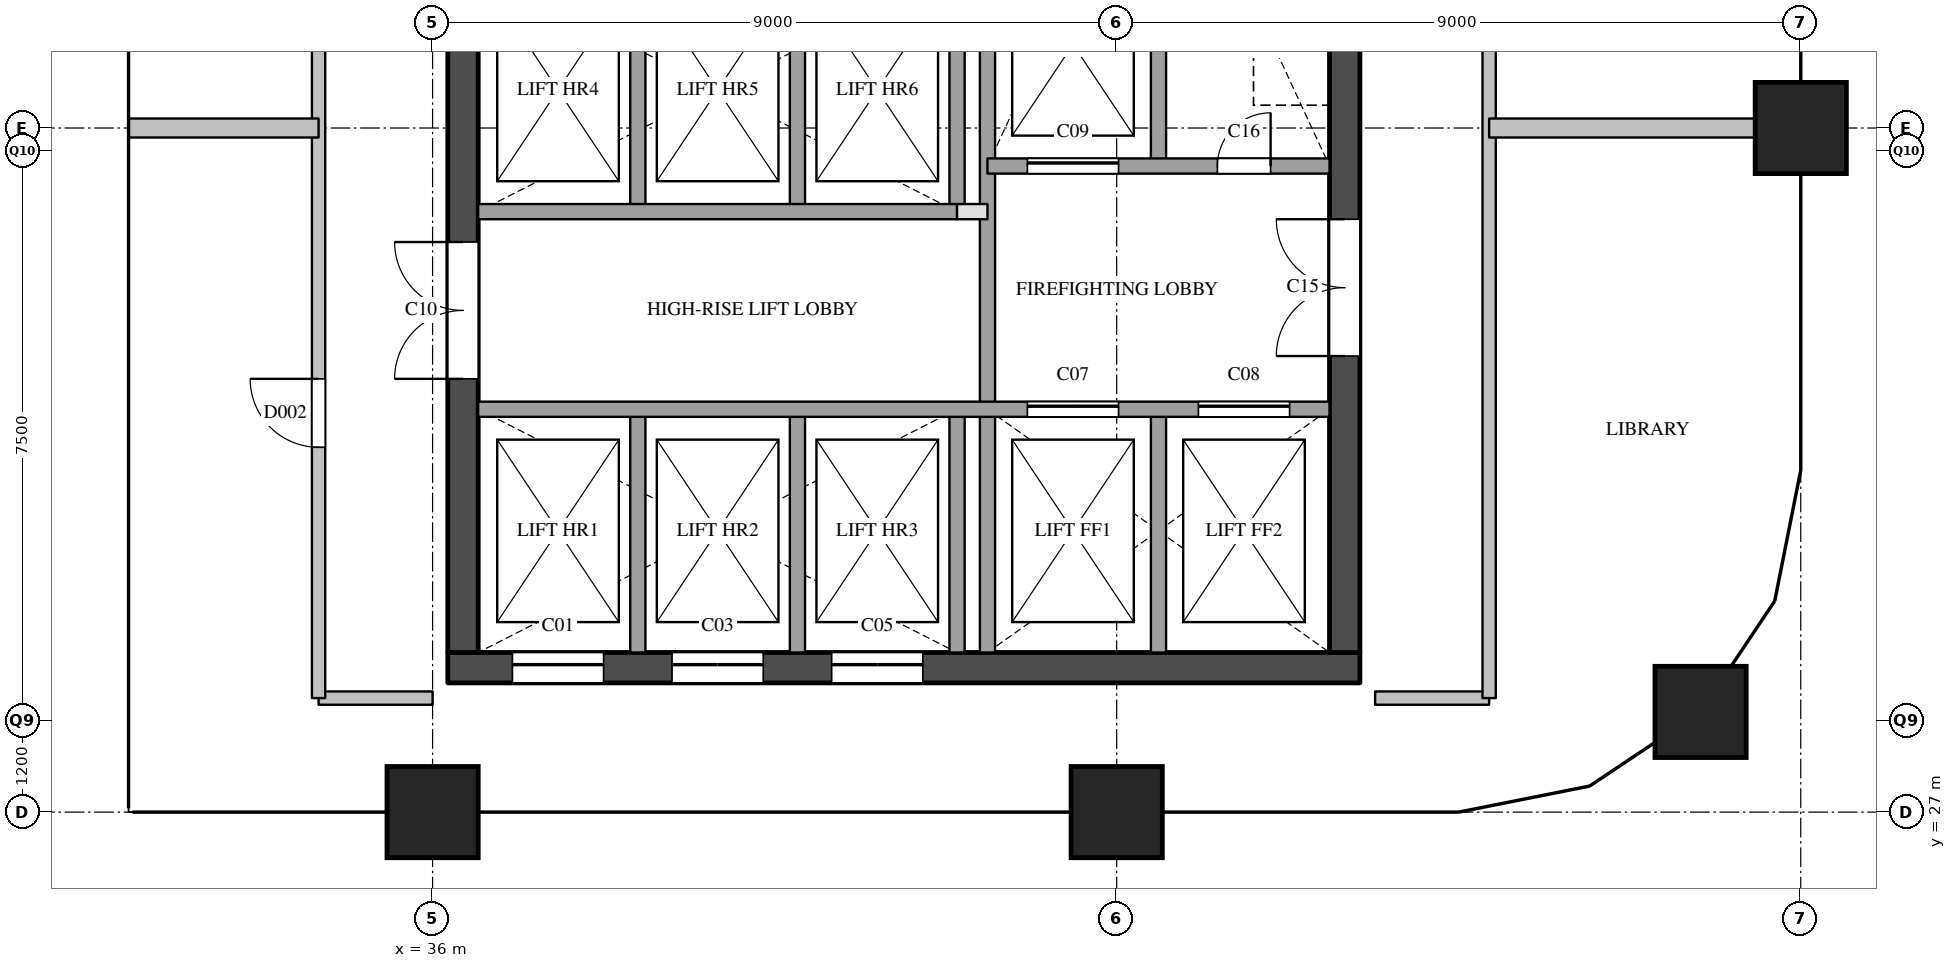
"""IFC4 building model, lengths in metres.
Left out: names, types, materials, properties, quantities, classifications, styles, units other than length and angle.
Written with IfcOpenShell. Run it as: python <this file> out.ifc"""

import sys

from ifc_helpers import new_model, si_unit, direction, frame, frame_2d, origin, origin_2d, place, context, subcontext, project, spatial, rectangle, extrude, element, fill, save


model = new_model("IFC4")
c1 = context("Model", 3, precision=1e-05, world=origin(), true_north=direction((0.0, 1.0)))
c2 = subcontext(c1, "Body", "Model", "MODEL_VIEW")
j1 = project(units=[si_unit("LENGTHUNIT", "METRE"), si_unit("PLANEANGLEUNIT", "RADIAN")], contexts=[c1])
p1 = place(None, origin())
s1 = spatial("IfcSite", under=j1, at=p1, CompositionType="ELEMENT")
p2 = place(p1, origin())
s2 = spatial("IfcBuilding", under=s1, at=p2, CompositionType="ELEMENT")
p3 = place(p2, frame((0.0, 0.0, 218.9)))
s3 = spatial("IfcBuildingStorey", under=s2, at=p3, CompositionType="ELEMENT", Elevation=218.9)
for number, where, z_axis, x_axis in (
    (1, (36.0, 27.0, 0.0), (0.0, 0.0, 1.0), (1.0, 0.0, 0.0)),
    (2, (45.0, 27.0, 0.0), (0.0, 0.0, 1.0), (1.0, 0.0, 0.0)),
    (3, (52.682, 28.318, 0.0), (0.0, 0.0, 1.0), (1.0, 0.0, 0.0)),
    (4, (54.0, 36.0, 0.0), (0.0, 0.0, 1.0), (1.0, 0.0, 0.0)),
):
    element("IfcColumn", number, at=place(p3, frame(where, z_axis=z_axis, x_axis=x_axis)), inside=s3, PredefinedType="COLUMN", context=c2, shape_type="SweptSolid", body=[
        extrude(rectangle(XDim=1.2, YDim=1.2, at=origin_2d()), origin(), (0.0, 0.0, 1.0), 3.9),
    ])
p4 = place(p3, frame((36.2, 28.9, 0.0), z_axis=(0.0, 0.0, 1.0), x_axis=(1.0, 0.0, 0.0)))
e5 = element("IfcWall", 5, at=p4, inside=s3, PredefinedType="SHEAR", context=c2, shape_type="SweptSolid", body=[
    extrude(rectangle(XDim=12.0, YDim=0.4, at=frame_2d((6.0, 0.0))), origin(), (0.0, 0.0, 1.0), 3.6),
])
p5 = place(p4, frame((0.85, 0.0, 0.0)))
e6 = element("IfcOpeningElement", 6, at=p5, cuts=e5, PredefinedType="OPENING", context=c2, shape_type="SweptSolid", body=[
    extrude(rectangle(XDim=1.2, YDim=2.1, at=frame_2d((0.6, 1.05))), frame((0.0, 0.21, 0.0), z_axis=(0.0, -1.0, 0.0), x_axis=(1.0, 0.0, 0.0)), (0.0, 0.0, 1.0), 0.42),
])
p6 = place(p4, frame((2.95, 0.0, 0.0)))
e7 = element("IfcOpeningElement", 7, at=p6, cuts=e5, PredefinedType="OPENING", context=c2, shape_type="SweptSolid", body=[
    extrude(rectangle(XDim=1.2, YDim=2.1, at=frame_2d((0.6, 1.05))), frame((0.0, 0.21, 0.0), z_axis=(0.0, -1.0, 0.0), x_axis=(1.0, 0.0, 0.0)), (0.0, 0.0, 1.0), 0.42),
])
p7 = place(p4, frame((5.05, 0.0, 0.0)))
e8 = element("IfcOpeningElement", 8, at=p7, cuts=e5, PredefinedType="OPENING", context=c2, shape_type="SweptSolid", body=[
    extrude(rectangle(XDim=1.2, YDim=2.1, at=frame_2d((0.6, 1.05))), frame((0.0, 0.21, 0.0), z_axis=(0.0, -1.0, 0.0), x_axis=(1.0, 0.0, 0.0)), (0.0, 0.0, 1.0), 0.42),
])
p8 = place(p3, frame((36.4, 29.1, 0.0), z_axis=(0.0, 0.0, 1.0), x_axis=(0.0, 1.0, 0.0)))
e9 = element("IfcWall", 9, at=p8, inside=s3, PredefinedType="SHEAR", context=c2, shape_type="SweptSolid", body=[
    extrude(rectangle(XDim=20.3, YDim=0.4, at=frame_2d((10.15, 0.0))), origin(), (0.0, 0.0, 1.0), 3.6),
])
p9 = place(p8, frame((3.6, 0.0, 0.0)))
e10 = element("IfcOpeningElement", 10, at=p9, cuts=e9, PredefinedType="OPENING", context=c2, shape_type="SweptSolid", body=[
    extrude(rectangle(XDim=1.8, YDim=2.1, at=frame_2d((0.9, 1.05))), frame((0.0, 0.21, 0.0), z_axis=(0.0, -1.0, 0.0), x_axis=(1.0, 0.0, 0.0)), (0.0, 0.0, 1.0), 0.42),
])
p10 = place(p8, frame((16.4, 0.0, 0.0)))
e11 = element("IfcOpeningElement", 11, at=p10, cuts=e9, PredefinedType="OPENING", context=c2, shape_type="SweptSolid", body=[
    extrude(rectangle(XDim=1.0, YDim=2.1, at=frame_2d((0.5, 1.05))), frame((0.0, 0.21, 0.0), z_axis=(0.0, -1.0, 0.0), x_axis=(1.0, 0.0, 0.0)), (0.0, 0.0, 1.0), 0.42),
])
p11 = place(p3, frame((48.0, 29.1, 0.0), z_axis=(0.0, 0.0, 1.0), x_axis=(0.0, 1.0, 0.0)))
e12 = element("IfcWall", 12, at=p11, inside=s3, PredefinedType="SHEAR", context=c2, shape_type="SweptSolid", body=[
    extrude(rectangle(XDim=20.3, YDim=0.4, at=frame_2d((10.15, 0.0))), origin(), (0.0, 0.0, 1.0), 3.6),
])
p12 = place(p11, frame((12.5, 0.0, 0.0)))
e13 = element("IfcOpeningElement", 13, at=p12, cuts=e12, PredefinedType="OPENING", context=c2, shape_type="SweptSolid", body=[
    extrude(rectangle(XDim=0.7, YDim=2.1, at=frame_2d((0.35, 1.05))), frame((0.0, 0.21, 0.0), z_axis=(0.0, -1.0, 0.0), x_axis=(1.0, 0.0, 0.0)), (0.0, 0.0, 1.0), 0.42),
])
p13 = place(p11, frame((3.9, 0.0, 0.0)))
e14 = element("IfcOpeningElement", 14, at=p13, cuts=e12, PredefinedType="OPENING", context=c2, shape_type="SweptSolid", body=[
    extrude(rectangle(XDim=1.8, YDim=2.1, at=frame_2d((0.9, 1.05))), frame((0.0, 0.21, 0.0), z_axis=(0.0, -1.0, 0.0), x_axis=(1.0, 0.0, 0.0)), (0.0, 0.0, 1.0), 0.42),
])
p14 = place(p3, frame((38.7, 29.1, 0.0), z_axis=(0.0, 0.0, 1.0), x_axis=(0.0, 1.0, 0.0)))
e15 = element("IfcWall", 15, at=p14, inside=s3, PredefinedType="SOLIDWALL", context=c2, shape_type="SweptSolid", body=[
    extrude(rectangle(XDim=3.2, YDim=0.2, at=frame_2d((1.6, 0.0))), origin(), (0.0, 0.0, 1.0), 3.6),
])
p15 = place(p3, frame((38.7, 34.9, 0.0), z_axis=(0.0, 0.0, 1.0), x_axis=(0.0, 1.0, 0.0)))
e16 = element("IfcWall", 16, at=p15, inside=s3, PredefinedType="SOLIDWALL", context=c2, shape_type="SweptSolid", body=[
    extrude(rectangle(XDim=3.2, YDim=0.2, at=frame_2d((1.6, 0.0))), origin(), (0.0, 0.0, 1.0), 3.6),
])
p16 = place(p3, frame((40.8, 29.1, 0.0), z_axis=(0.0, 0.0, 1.0), x_axis=(0.0, 1.0, 0.0)))
e17 = element("IfcWall", 17, at=p16, inside=s3, PredefinedType="SOLIDWALL", context=c2, shape_type="SweptSolid", body=[
    extrude(rectangle(XDim=3.2, YDim=0.2, at=frame_2d((1.6, 0.0))), origin(), (0.0, 0.0, 1.0), 3.6),
])
p17 = place(p3, frame((40.8, 34.9, 0.0), z_axis=(0.0, 0.0, 1.0), x_axis=(0.0, 1.0, 0.0)))
e18 = element("IfcWall", 18, at=p17, inside=s3, PredefinedType="SOLIDWALL", context=c2, shape_type="SweptSolid", body=[
    extrude(rectangle(XDim=3.2, YDim=0.2, at=frame_2d((1.6, 0.0))), origin(), (0.0, 0.0, 1.0), 3.6),
])
p18 = place(p3, frame((42.9, 29.1, 0.0), z_axis=(0.0, 0.0, 1.0), x_axis=(0.0, 1.0, 0.0)))
e19 = element("IfcWall", 19, at=p18, inside=s3, PredefinedType="SOLIDWALL", context=c2, shape_type="SweptSolid", body=[
    extrude(rectangle(XDim=3.2, YDim=0.2, at=frame_2d((1.6, 0.0))), origin(), (0.0, 0.0, 1.0), 3.6),
])
p19 = place(p3, frame((42.9, 34.9, 0.0), z_axis=(0.0, 0.0, 1.0), x_axis=(0.0, 1.0, 0.0)))
e20 = element("IfcWall", 20, at=p19, inside=s3, PredefinedType="SOLIDWALL", context=c2, shape_type="SweptSolid", body=[
    extrude(rectangle(XDim=3.2, YDim=0.2, at=frame_2d((1.6, 0.0))), origin(), (0.0, 0.0, 1.0), 3.6),
])
p20 = place(p3, frame((43.3, 29.1, 0.0), z_axis=(0.0, 0.0, 1.0), x_axis=(0.0, 1.0, 0.0)))
e21 = element("IfcWall", 21, at=p20, inside=s3, PredefinedType="SOLIDWALL", context=c2, shape_type="SweptSolid", body=[
    extrude(rectangle(XDim=9.9, YDim=0.2, at=frame_2d((4.95, 0.0))), origin(), (0.0, 0.0, 1.0), 3.6),
])
for number, where, z_axis, x_axis in (
    (22, (45.55, 29.1, 0.0), (0.0, 0.0, 1.0), (0.0, 1.0, 0.0)),
    (23, (45.55, 35.5, 0.0), (0.0, 0.0, 1.0), (0.0, 1.0, 0.0)),
):
    element("IfcWall", number, at=place(p3, frame(where, z_axis=z_axis, x_axis=x_axis)), inside=s3, PredefinedType="SOLIDWALL", context=c2, shape_type="SweptSolid", body=[
        extrude(rectangle(XDim=3.2, YDim=0.2, at=frame_2d((1.6, 0.0))), origin(), (0.0, 0.0, 1.0), 3.6),
    ])
p21 = place(p3, frame((36.6, 32.3, 0.0), z_axis=(0.0, 0.0, 1.0), x_axis=(1.0, 0.0, 0.0)))
e24 = element("IfcWall", 24, at=p21, inside=s3, PredefinedType="SOLIDWALL", context=c2, shape_type="SweptSolid", body=[
    extrude(rectangle(XDim=11.2, YDim=0.2, at=frame_2d((5.6, 0.0))), origin(), (0.0, 0.0, 1.0), 3.6),
])
p22 = place(p21, frame((7.225, 0.0, 0.0)))
e25 = element("IfcOpeningElement", 25, at=p22, cuts=e24, PredefinedType="OPENING", context=c2, shape_type="SweptSolid", body=[
    extrude(rectangle(XDim=1.2, YDim=2.1, at=frame_2d((0.6, 1.05))), frame((0.0, 0.11, 0.0), z_axis=(0.0, -1.0, 0.0), x_axis=(1.0, 0.0, 0.0)), (0.0, 0.0, 1.0), 0.22),
])
p23 = place(p21, frame((9.475, 0.0, 0.0)))
e26 = element("IfcOpeningElement", 26, at=p23, cuts=e24, PredefinedType="OPENING", context=c2, shape_type="SweptSolid", body=[
    extrude(rectangle(XDim=1.2, YDim=2.1, at=frame_2d((0.6, 1.05))), frame((0.0, 0.11, 0.0), z_axis=(0.0, -1.0, 0.0), x_axis=(1.0, 0.0, 0.0)), (0.0, 0.0, 1.0), 0.22),
])
p24 = place(p3, frame((42.9, 34.9, 0.0), z_axis=(0.0, 0.0, 1.0), x_axis=(1.0, 0.0, 0.0)))
e27 = element("IfcWall", 27, at=p24, inside=s3, PredefinedType="PARTITIONING", context=c2, shape_type="SweptSolid", body=[
    extrude(rectangle(XDim=0.4, YDim=0.2, at=frame_2d((0.2, 0.0))), origin(), (0.0, 0.0, 1.0), 3.6),
])
p25 = place(p3, frame((36.6, 34.9, 0.0), z_axis=(0.0, 0.0, 1.0), x_axis=(1.0, 0.0, 0.0)))
e28 = element("IfcWall", 28, at=p25, inside=s3, PredefinedType="SOLIDWALL", context=c2, shape_type="SweptSolid", body=[
    extrude(rectangle(XDim=6.3, YDim=0.2, at=frame_2d((3.15, 0.0))), origin(), (0.0, 0.0, 1.0), 3.6),
])
p26 = place(p3, frame((43.3, 35.5, 0.0), z_axis=(0.0, 0.0, 1.0), x_axis=(1.0, 0.0, 0.0)))
e29 = element("IfcWall", 29, at=p26, inside=s3, PredefinedType="SOLIDWALL", context=c2, shape_type="SweptSolid", body=[
    extrude(rectangle(XDim=4.5, YDim=0.2, at=frame_2d((2.25, 0.0))), origin(), (0.0, 0.0, 1.0), 3.6),
])
p27 = place(p26, frame((0.525, 0.0, 0.0)))
e30 = element("IfcOpeningElement", 30, at=p27, cuts=e29, PredefinedType="OPENING", context=c2, shape_type="SweptSolid", body=[
    extrude(rectangle(XDim=1.2, YDim=2.1, at=frame_2d((0.6, 1.05))), frame((0.0, 0.11, 0.0), z_axis=(0.0, -1.0, 0.0), x_axis=(1.0, 0.0, 0.0)), (0.0, 0.0, 1.0), 0.22),
])
p28 = place(p26, frame((3.025, 0.0, 0.0)))
e31 = element("IfcOpeningElement", 31, at=p28, cuts=e29, PredefinedType="OPENING", context=c2, shape_type="SweptSolid", body=[
    extrude(rectangle(XDim=0.7, YDim=2.1, at=frame_2d((0.35, 1.05))), frame((0.0, 0.11, 0.0), z_axis=(0.0, -1.0, 0.0), x_axis=(1.0, 0.0, 0.0)), (0.0, 0.0, 1.0), 0.22),
])
for number, where, z_axis, x_axis in (
    (32, (34.5, 28.5, 0.0), (0.0, 0.0, 1.0), (1.0, 0.0, 0.0)),
    (33, (48.4, 28.5, 0.0), (0.0, 0.0, 1.0), (1.0, 0.0, 0.0)),
):
    element("IfcWall", number, at=place(p3, frame(where, z_axis=z_axis, x_axis=x_axis)), inside=s3, PredefinedType="PARTITIONING", context=c2, shape_type="SweptSolid", body=[
        extrude(rectangle(XDim=1.5, YDim=0.175, at=frame_2d((0.75, 0.0))), origin(), (0.0, 0.0, 1.0), 3.6),
    ])
p29 = place(p3, frame((34.5, 28.5, 0.0), z_axis=(0.0, 0.0, 1.0), x_axis=(0.0, 1.0, 0.0)))
e34 = element("IfcWall", 34, at=p29, inside=s3, PredefinedType="PARTITIONING", context=c2, shape_type="SweptSolid", body=[
    extrude(rectangle(XDim=15.75, YDim=0.175, at=frame_2d((7.875, 0.0))), origin(), (0.0, 0.0, 1.0), 3.6),
])
p30 = place(p29, frame((3.3, 0.0, 0.0)))
e35 = element("IfcOpeningElement", 35, at=p30, cuts=e34, PredefinedType="OPENING", context=c2, shape_type="SweptSolid", body=[
    extrude(rectangle(XDim=0.9, YDim=2.1, at=frame_2d((0.45, 1.05))), frame((0.0, 0.097, 0.0), z_axis=(0.0, -1.0, 0.0), x_axis=(1.0, 0.0, 0.0)), (0.0, 0.0, 1.0), 0.195),
])
p31 = place(p29, frame((11.175, 0.0, 0.0)))
e36 = element("IfcOpeningElement", 36, at=p31, cuts=e34, PredefinedType="OPENING", context=c2, shape_type="SweptSolid", body=[
    extrude(rectangle(XDim=0.9, YDim=2.1, at=frame_2d((0.45, 1.05))), frame((0.0, 0.097, 0.0), z_axis=(0.0, -1.0, 0.0), x_axis=(1.0, 0.0, 0.0)), (0.0, 0.0, 1.0), 0.195),
])
p32 = place(p3, frame((49.9, 28.5, 0.0), z_axis=(0.0, 0.0, 1.0), x_axis=(0.0, 1.0, 0.0)))
e37 = element("IfcWall", 37, at=p32, inside=s3, PredefinedType="PARTITIONING", context=c2, shape_type="SweptSolid", body=[
    extrude(rectangle(XDim=23.0, YDim=0.175, at=frame_2d((11.5, 0.0))), origin(), (0.0, 0.0, 1.0), 3.6),
])
p33 = place(p32, frame((14.8, 0.0, 0.0)))
e38 = element("IfcOpeningElement", 38, at=p33, cuts=e37, PredefinedType="OPENING", context=c2, shape_type="SweptSolid", body=[
    extrude(rectangle(XDim=0.9, YDim=2.1, at=frame_2d((0.45, 1.05))), frame((0.0, 0.097, 0.0), z_axis=(0.0, -1.0, 0.0), x_axis=(1.0, 0.0, 0.0)), (0.0, 0.0, 1.0), 0.195),
])
p34 = place(p3, frame((32.0, 36.0, 0.0), z_axis=(0.0, 0.0, 1.0), x_axis=(1.0, 0.0, 0.0)))
e39 = element("IfcWall", 39, at=p34, inside=s3, PredefinedType="PARTITIONING", context=c2, shape_type="SweptSolid", body=[
    extrude(rectangle(XDim=2.5, YDim=0.25, at=frame_2d((1.25, 0.0))), origin(), (0.0, 0.0, 1.0), 3.6),
])
p35 = place(p3, frame((49.9, 36.0, 0.0), z_axis=(0.0, 0.0, 1.0), x_axis=(1.0, 0.0, 0.0)))
e40 = element("IfcWall", 40, at=p35, inside=s3, PredefinedType="PARTITIONING", context=c2, shape_type="SweptSolid", body=[
    extrude(rectangle(XDim=4.1, YDim=0.25, at=frame_2d((2.05, 0.0))), origin(), (0.0, 0.0, 1.0), 3.6),
])
p36 = place(p5, origin())
e41 = element("IfcDoor", 41, at=p36, inside=s3, OperationType="SLIDING_TO_LEFT", PredefinedType="DOOR", context=c2, shape_type="SweptSolid", body=[
    extrude(rectangle(XDim=1.2, YDim=2.1, at=frame_2d((0.6, 1.05))), frame((0.0, 0.025, 0.0), z_axis=(0.0, -1.0, 0.0), x_axis=(1.0, 0.0, 0.0)), (0.0, 0.0, 1.0), 0.05),
])
fill(e6, e41)
p37 = place(p6, origin())
e42 = element("IfcDoor", 42, at=p37, inside=s3, OperationType="SLIDING_TO_LEFT", PredefinedType="DOOR", context=c2, shape_type="SweptSolid", body=[
    extrude(rectangle(XDim=1.2, YDim=2.1, at=frame_2d((0.6, 1.05))), frame((0.0, 0.025, 0.0), z_axis=(0.0, -1.0, 0.0), x_axis=(1.0, 0.0, 0.0)), (0.0, 0.0, 1.0), 0.05),
])
fill(e7, e42)
p38 = place(p7, origin())
e43 = element("IfcDoor", 43, at=p38, inside=s3, OperationType="SLIDING_TO_LEFT", PredefinedType="DOOR", context=c2, shape_type="SweptSolid", body=[
    extrude(rectangle(XDim=1.2, YDim=2.1, at=frame_2d((0.6, 1.05))), frame((0.0, 0.025, 0.0), z_axis=(0.0, -1.0, 0.0), x_axis=(1.0, 0.0, 0.0)), (0.0, 0.0, 1.0), 0.05),
])
fill(e8, e43)
p39 = place(p22, origin())
e44 = element("IfcDoor", 44, at=p39, inside=s3, OperationType="SLIDING_TO_LEFT", PredefinedType="DOOR", context=c2, shape_type="SweptSolid", body=[
    extrude(rectangle(XDim=1.2, YDim=2.1, at=frame_2d((0.6, 1.05))), frame((0.0, 0.025, 0.0), z_axis=(0.0, -1.0, 0.0), x_axis=(1.0, 0.0, 0.0)), (0.0, 0.0, 1.0), 0.05),
])
fill(e25, e44)
p40 = place(p23, origin())
e45 = element("IfcDoor", 45, at=p40, inside=s3, OperationType="SLIDING_TO_LEFT", PredefinedType="DOOR", context=c2, shape_type="SweptSolid", body=[
    extrude(rectangle(XDim=1.2, YDim=2.1, at=frame_2d((0.6, 1.05))), frame((0.0, 0.025, 0.0), z_axis=(0.0, -1.0, 0.0), x_axis=(1.0, 0.0, 0.0)), (0.0, 0.0, 1.0), 0.05),
])
fill(e26, e45)
p41 = place(p27, origin())
e46 = element("IfcDoor", 46, at=p41, inside=s3, OperationType="SLIDING_TO_LEFT", PredefinedType="DOOR", context=c2, shape_type="SweptSolid", body=[
    extrude(rectangle(XDim=1.2, YDim=2.1, at=frame_2d((0.6, 1.05))), frame((0.0, 0.025, 0.0), z_axis=(0.0, -1.0, 0.0), x_axis=(1.0, 0.0, 0.0)), (0.0, 0.0, 1.0), 0.05),
])
fill(e30, e46)
p42 = place(p9, origin())
e47 = element("IfcDoor", 47, at=p42, inside=s3, OperationType="DOUBLE_DOOR_SINGLE_SWING", PredefinedType="DOOR", context=c2, shape_type="SweptSolid", body=[
    extrude(rectangle(XDim=1.8, YDim=2.1, at=frame_2d((0.9, 1.05))), frame((0.0, 0.025, 0.0), z_axis=(0.0, -1.0, 0.0), x_axis=(1.0, 0.0, 0.0)), (0.0, 0.0, 1.0), 0.05),
])
fill(e10, e47)
p43 = place(p13, origin())
e48 = element("IfcDoor", 48, at=p43, inside=s3, OperationType="DOUBLE_DOOR_SINGLE_SWING", PredefinedType="DOOR", context=c2, shape_type="SweptSolid", body=[
    extrude(rectangle(XDim=1.8, YDim=2.1, at=frame_2d((0.9, 1.05))), frame((0.0, 0.025, 0.0), z_axis=(0.0, -1.0, 0.0), x_axis=(1.0, 0.0, 0.0)), (0.0, 0.0, 1.0), 0.05),
])
fill(e14, e48)
p44 = place(p28, origin())
e49 = element("IfcDoor", 49, at=p44, inside=s3, OperationType="SINGLE_SWING_RIGHT", PredefinedType="DOOR", context=c2, shape_type="SweptSolid", body=[
    extrude(rectangle(XDim=0.7, YDim=2.1, at=frame_2d((0.35, 1.05))), frame((0.0, 0.025, 0.0), z_axis=(0.0, -1.0, 0.0), x_axis=(1.0, 0.0, 0.0)), (0.0, 0.0, 1.0), 0.05),
])
fill(e31, e49)
p45 = place(p30, origin())
e50 = element("IfcDoor", 50, at=p45, inside=s3, OperationType="SINGLE_SWING_RIGHT", PredefinedType="DOOR", context=c2, shape_type="SweptSolid", body=[
    extrude(rectangle(XDim=0.9, YDim=2.1, at=frame_2d((0.45, 1.05))), frame((0.0, 0.025, 0.0), z_axis=(0.0, -1.0, 0.0), x_axis=(1.0, 0.0, 0.0)), (0.0, 0.0, 1.0), 0.05),
])
fill(e35, e50)
save(model, sys.argv[1])
